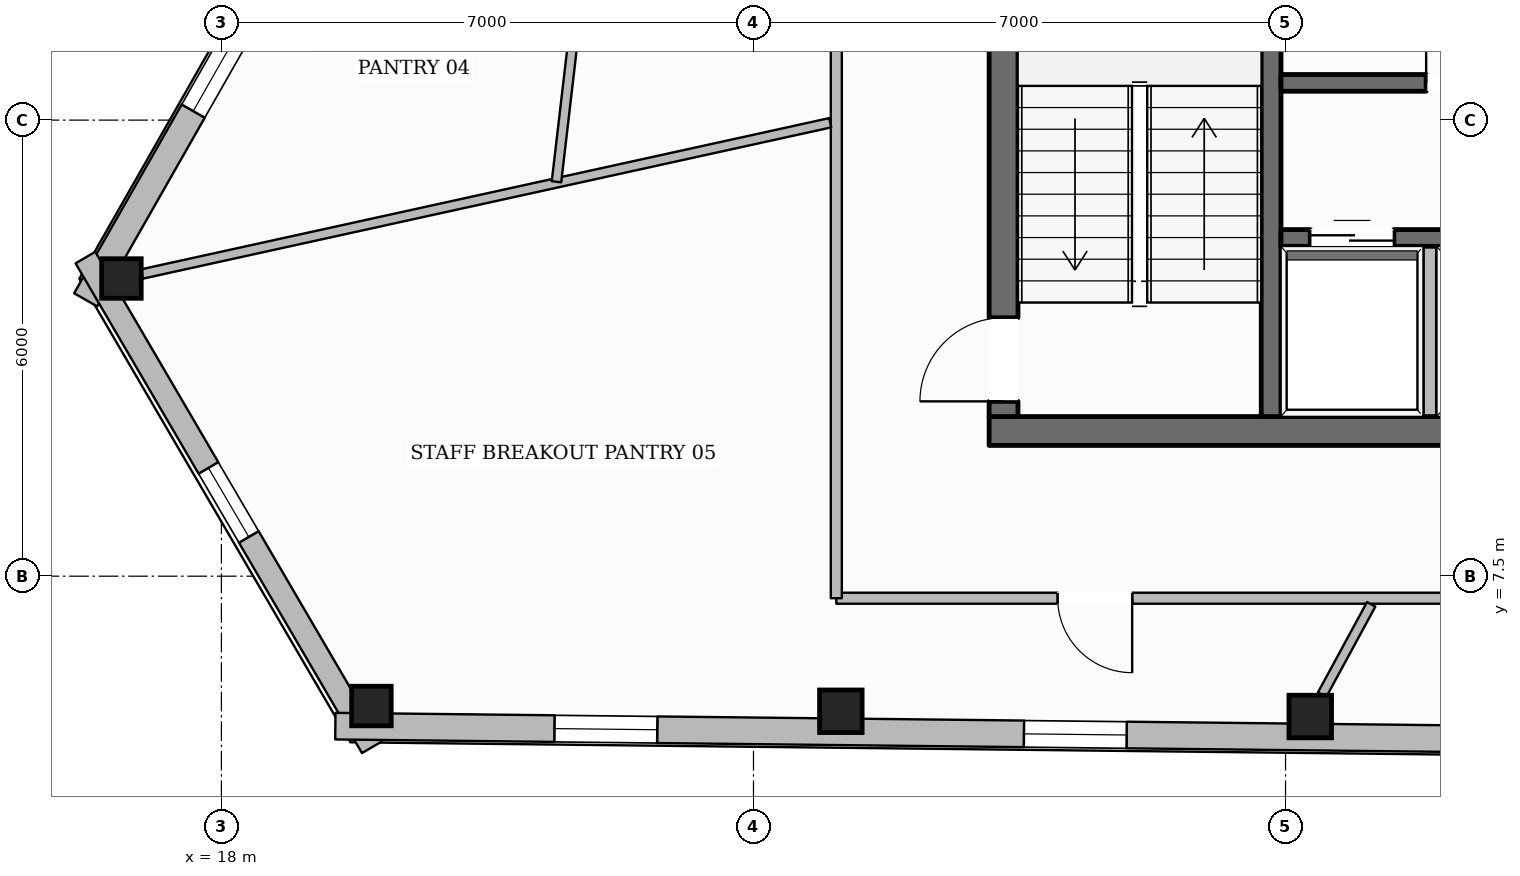
"""IFC4 building model, lengths in metres.
Left out: names, types, materials, properties, quantities, classifications, styles, units other than length and angle.
Written with IfcOpenShell. Run it as: python <this file> out.ifc"""

import sys

from ifc_helpers import new_model, si_unit, direction, frame, frame_2d, origin, origin_2d, place, context, subcontext, project, spatial, rectangle, hollow_rectangle, extrude, element, fill, save


model = new_model("IFC4")
c1 = context("Model", 3, precision=1e-05, world=origin(), true_north=direction((0.0, 1.0)))
c2 = subcontext(c1, "Body", "Model", "MODEL_VIEW")
j1 = project(units=[si_unit("LENGTHUNIT", "METRE"), si_unit("PLANEANGLEUNIT", "RADIAN")], contexts=[c1])
p1 = place(None, origin())
s1 = spatial("IfcSite", under=j1, at=p1, CompositionType="ELEMENT")
p2 = place(p1, origin())
s2 = spatial("IfcBuilding", under=s1, at=p2, CompositionType="ELEMENT")
p3 = place(p2, frame((0.0, 0.0, 251.05)))
s3 = spatial("IfcBuildingStorey", under=s2, at=p3, CompositionType="ELEMENT", Elevation=251.05)
p4 = place(p3, frame((28.1, 9.41, 0.0), z_axis=(0.0, 0.0, 1.0), x_axis=(1.0, 0.0, 0.0)))
e1 = element("IfcWall", 1, at=p4, inside=s3, PredefinedType="SOLIDWALL", context=c2, shape_type="SweptSolid", body=[
    extrude(rectangle(XDim=19.8, YDim=0.38, at=frame_2d((9.9, 0.0))), origin(), (0.0, 0.0, 1.0), 3.61),
])
p5 = place(p4, frame((10.4, 0.0, 0.0)))
e2 = element("IfcOpeningElement", 2, at=p5, cuts=e1, PredefinedType="OPENING", context=c2, shape_type="SweptSolid", body=[
    extrude(rectangle(XDim=1.4, YDim=2.2, at=frame_2d((0.7, 1.1))), frame((0.0, 0.2, 0.0), z_axis=(0.0, -1.0, 0.0), x_axis=(1.0, 0.0, 0.0)), (0.0, 0.0, 1.0), 0.4),
])
p6 = place(p3, frame((28.29, 9.6, 0.0), z_axis=(0.0, 0.0, 1.0), x_axis=(0.0, 1.0, 0.0)))
e3 = element("IfcWall", 3, at=p6, inside=s3, PredefinedType="SOLIDWALL", context=c2, shape_type="SweptSolid", body=[
    extrude(rectangle(XDim=13.0, YDim=0.38, at=frame_2d((6.5, 0.0))), origin(), (0.0, 0.0, 1.0), 3.61),
])
p7 = place(p6, frame((0.2, 0.0, 0.0)))
e4 = element("IfcOpeningElement", 4, at=p7, cuts=e3, PredefinedType="OPENING", context=c2, shape_type="SweptSolid", body=[
    extrude(rectangle(XDim=1.1, YDim=2.15, at=frame_2d((0.55, 1.075))), frame((0.0, 0.2, 0.0), z_axis=(0.0, -1.0, 0.0), x_axis=(1.0, 0.0, 0.0)), (0.0, 0.0, 1.0), 0.4),
])
p8 = place(p6, frame((8.4, 0.0, 0.0)))
e5 = element("IfcOpeningElement", 5, at=p8, cuts=e3, PredefinedType="OPENING", context=c2, shape_type="SweptSolid", body=[
    extrude(rectangle(XDim=0.9, YDim=2.1, at=frame_2d((0.45, 1.05))), frame((0.0, 0.2, 0.0), z_axis=(0.0, -1.0, 0.0), x_axis=(1.0, 0.0, 0.0)), (0.0, 0.0, 1.0), 0.4),
])
p9 = place(p3, frame((31.81, 9.6, 0.0), z_axis=(0.0, 0.0, 1.0), x_axis=(0.0, 1.0, 0.0)))
e6 = element("IfcWall", 6, at=p9, inside=s3, PredefinedType="SHEAR", context=c2, shape_type="SweptSolid", body=[
    extrude(rectangle(XDim=13.0, YDim=0.26, at=frame_2d((6.5, 0.0))), origin(), (0.0, 0.0, 1.0), 3.61),
])
p10 = place(p9, frame((10.925, 0.0, 0.0)))
e7 = element("IfcOpeningElement", 7, at=p10, cuts=e6, PredefinedType="OPENING", context=c2, shape_type="SweptSolid", body=[
    extrude(rectangle(XDim=1.25, YDim=2.25, at=frame_2d((0.625, 1.125))), frame((0.0, 0.14, 0.0), z_axis=(0.0, -1.0, 0.0), x_axis=(1.0, 0.0, 0.0)), (0.0, 0.0, 1.0), 0.28),
])
p11 = place(p3, frame((31.94, 13.99, 0.0), z_axis=(0.0, 0.0, 1.0), x_axis=(1.0, 0.0, 0.0)))
e8 = element("IfcWall", 8, at=p11, inside=s3, PredefinedType="SOLIDWALL", context=c2, shape_type="SweptSolid", body=[
    extrude(rectangle(XDim=12.12, YDim=0.22, at=frame_2d((6.06, 0.0))), origin(), (0.0, 0.0, 1.0), 3.61),
])
p12 = place(p11, frame((1.91, 0.0, 0.0)))
e9 = element("IfcOpeningElement", 9, at=p12, cuts=e8, PredefinedType="OPENING", context=c2, shape_type="SweptSolid", body=[
    extrude(rectangle(XDim=0.9, YDim=2.1, at=frame_2d((0.45, 1.05))), frame((0.0, 0.12, 0.0), z_axis=(0.0, -1.0, 0.0), x_axis=(1.0, 0.0, 0.0)), (0.0, 0.0, 1.0), 0.24),
])
p13 = place(p11, frame((7.95, 0.0, 0.0)))
e10 = element("IfcOpeningElement", 10, at=p13, cuts=e8, PredefinedType="OPENING", context=c2, shape_type="SweptSolid", body=[
    extrude(rectangle(XDim=1.02, YDim=2.15, at=frame_2d((0.51, 1.075))), frame((0.0, 0.12, 0.0), z_axis=(0.0, -1.0, 0.0), x_axis=(1.0, 0.0, 0.0)), (0.0, 0.0, 1.0), 0.24),
])
p14 = place(p3, frame((31.94, 11.95, 0.0), z_axis=(0.0, 0.0, 1.0), x_axis=(1.0, 0.0, 0.0)))
e11 = element("IfcWall", 11, at=p14, inside=s3, PredefinedType="SOLIDWALL", context=c2, shape_type="SweptSolid", body=[
    extrude(rectangle(XDim=6.19, YDim=0.22, at=frame_2d((3.095, 0.0))), origin(), (0.0, 0.0, 1.0), 3.61),
])
p15 = place(p14, frame((0.385, 0.0, 0.0)))
e12 = element("IfcOpeningElement", 12, at=p15, cuts=e11, PredefinedType="OPENING", context=c2, shape_type="SweptSolid", body=[
    extrude(rectangle(XDim=1.1, YDim=2.2, at=frame_2d((0.55, 1.1))), frame((0.0, 0.12, 0.0), z_axis=(0.0, -1.0, 0.0), x_axis=(1.0, 0.0, 0.0)), (0.0, 0.0, 1.0), 0.24),
])
p16 = place(p14, frame((2.435, 0.0, 0.0)))
e13 = element("IfcOpeningElement", 13, at=p16, cuts=e11, PredefinedType="OPENING", context=c2, shape_type="SweptSolid", body=[
    extrude(rectangle(XDim=1.1, YDim=2.2, at=frame_2d((0.55, 1.1))), frame((0.0, 0.12, 0.0), z_axis=(0.0, -1.0, 0.0), x_axis=(1.0, 0.0, 0.0)), (0.0, 0.0, 1.0), 0.24),
])
p17 = place(p14, frame((4.485, 0.0, 0.0)))
e14 = element("IfcOpeningElement", 14, at=p17, cuts=e11, PredefinedType="OPENING", context=c2, shape_type="SweptSolid", body=[
    extrude(rectangle(XDim=1.1, YDim=2.2, at=frame_2d((0.55, 1.1))), frame((0.0, 0.12, 0.0), z_axis=(0.0, -1.0, 0.0), x_axis=(1.0, 0.0, 0.0)), (0.0, 0.0, 1.0), 0.24),
])
for number, where, z_axis, x_axis in (
    (15, (16.685, 11.416, 0.0), (0.0, 0.0, 1.0), (1.0, 0.0, 0.0)),
    (16, (19.974, 5.792, 0.0), (0.0, 0.0, 1.0), (1.0, 0.0, 0.0)),
):
    element("IfcColumn", number, at=place(p3, frame(where, z_axis=z_axis, x_axis=x_axis)), inside=s3, PredefinedType="COLUMN", context=c2, shape_type="SweptSolid", body=[
        extrude(hollow_rectangle(XDim=0.52, YDim=0.52, WallThickness=0.024, at=origin_2d()), origin(), (0.0, 0.0, 1.0), 3.61),
    ])
for number, where, z_axis, x_axis in (
    (17, (26.149, 5.723, 0.0), (0.0, 0.0, 1.0), (1.0, 0.0, 0.0)),
    (18, (32.325, 5.654, 0.0), (0.0, 0.0, 1.0), (1.0, 0.0, 0.0)),
):
    element("IfcColumn", number, at=place(p3, frame(where, z_axis=z_axis, x_axis=x_axis)), inside=s3, PredefinedType="COLUMN", context=c2, shape_type="SweptSolid", body=[
        extrude(hollow_rectangle(XDim=0.56, YDim=0.56, WallThickness=0.025, at=origin_2d()), origin(), (0.0, 0.0, 1.0), 3.61),
    ])
p18 = place(p3, frame((16.214, 11.135, 0.0), z_axis=(0.0, 0.0, 1.0), x_axis=(0.49510347201, 0.868834018673, 0.0)))
e19 = element("IfcWall", 19, at=p18, inside=s3, PredefinedType="STANDARD", context=c2, shape_type="SweptSolid", body=[
    extrude(rectangle(XDim=37.643, YDim=0.35, at=frame_2d((18.822, 0.0))), origin(), (0.0, 0.0, 1.0), 3.196),
])
p19 = place(p18, frame((33.429, 0.0, 0.65)))
e20 = element("IfcOpeningElement", 20, at=p19, cuts=e19, PredefinedType="OPENING", context=c2, shape_type="SweptSolid", body=[
    extrude(rectangle(XDim=1.35, YDim=1.75, at=frame_2d((0.675, 0.875))), frame((0.0, 0.185, 0.0), z_axis=(0.0, -1.0, 0.0), x_axis=(1.0, 0.0, 0.0)), (0.0, 0.0, 1.0), 0.37),
])
p20 = place(p18, frame((27.315, 0.0, 0.65)))
e21 = element("IfcOpeningElement", 21, at=p20, cuts=e19, PredefinedType="OPENING", context=c2, shape_type="SweptSolid", body=[
    extrude(rectangle(XDim=1.35, YDim=1.75, at=frame_2d((0.675, 0.875))), frame((0.0, 0.185, 0.0), z_axis=(0.0, -1.0, 0.0), x_axis=(1.0, 0.0, 0.0)), (0.0, 0.0, 1.0), 0.37),
])
p21 = place(p18, frame((15.087, 0.0, 0.65)))
e22 = element("IfcOpeningElement", 22, at=p21, cuts=e19, PredefinedType="OPENING", context=c2, shape_type="SweptSolid", body=[
    extrude(rectangle(XDim=1.35, YDim=1.75, at=frame_2d((0.675, 0.875))), frame((0.0, 0.185, 0.0), z_axis=(0.0, -1.0, 0.0), x_axis=(1.0, 0.0, 0.0)), (0.0, 0.0, 1.0), 0.37),
])
p22 = place(p18, frame((8.973, 0.0, 0.65)))
e23 = element("IfcOpeningElement", 23, at=p22, cuts=e19, PredefinedType="OPENING", context=c2, shape_type="SweptSolid", body=[
    extrude(rectangle(XDim=1.35, YDim=1.75, at=frame_2d((0.675, 0.875))), frame((0.0, 0.185, 0.0), z_axis=(0.0, -1.0, 0.0), x_axis=(1.0, 0.0, 0.0)), (0.0, 0.0, 1.0), 0.37),
])
p23 = place(p18, frame((2.859, 0.0, 0.65)))
e24 = element("IfcOpeningElement", 24, at=p23, cuts=e19, PredefinedType="OPENING", context=c2, shape_type="SweptSolid", body=[
    extrude(rectangle(XDim=1.35, YDim=1.75, at=frame_2d((0.675, 0.875))), frame((0.0, 0.185, 0.0), z_axis=(0.0, -1.0, 0.0), x_axis=(1.0, 0.0, 0.0)), (0.0, 0.0, 1.0), 0.37),
])
p24 = place(p3, frame((19.979, 5.248, 0.0), z_axis=(0.0, 0.0, 1.0), x_axis=(-0.50480008765, 0.863236277915, 0.0)))
e25 = element("IfcWall", 25, at=p24, inside=s3, PredefinedType="STANDARD", context=c2, shape_type="SweptSolid", body=[
    extrude(rectangle(XDim=7.464, YDim=0.3, at=frame_2d((3.732, 0.0))), origin(), (0.0, 0.0, 1.0), 3.196),
])
p25 = place(p24, frame((3.207, 0.0, 0.65)))
e26 = element("IfcOpeningElement", 26, at=p25, cuts=e25, PredefinedType="OPENING", context=c2, shape_type="SweptSolid", body=[
    extrude(rectangle(XDim=1.05, YDim=1.7, at=frame_2d((0.525, 0.85))), frame((0.0, 0.16, 0.0), z_axis=(0.0, -1.0, 0.0), x_axis=(1.0, 0.0, 0.0)), (0.0, 0.0, 1.0), 0.32),
])
p26 = place(p3, frame((57.506, 5.102, 0.0), z_axis=(0.0, 0.0, 1.0), x_axis=(-0.999937327785, 0.011195557226, 0.0)))
e27 = element("IfcWall", 27, at=p26, inside=s3, PredefinedType="STANDARD", context=c2, shape_type="SweptSolid", body=[
    extrude(rectangle(XDim=38.01, YDim=0.35, at=frame_2d((19.005, 0.0))), origin(), (0.0, 0.0, 1.0), 3.196),
])
p27 = place(p26, frame((33.775, 0.0, 0.65)))
e28 = element("IfcOpeningElement", 28, at=p27, cuts=e27, PredefinedType="OPENING", context=c2, shape_type="SweptSolid", body=[
    extrude(rectangle(XDim=1.35, YDim=1.75, at=frame_2d((0.675, 0.875))), frame((0.0, 0.185, 0.0), z_axis=(0.0, -1.0, 0.0), x_axis=(1.0, 0.0, 0.0)), (0.0, 0.0, 1.0), 0.37),
])
p28 = place(p26, frame((27.599, 0.0, 0.65)))
e29 = element("IfcOpeningElement", 29, at=p28, cuts=e27, PredefinedType="OPENING", context=c2, shape_type="SweptSolid", body=[
    extrude(rectangle(XDim=1.35, YDim=1.75, at=frame_2d((0.675, 0.875))), frame((0.0, 0.185, 0.0), z_axis=(0.0, -1.0, 0.0), x_axis=(1.0, 0.0, 0.0)), (0.0, 0.0, 1.0), 0.37),
])
p29 = place(p26, frame((15.247, 0.0, 0.65)))
e30 = element("IfcOpeningElement", 30, at=p29, cuts=e27, PredefinedType="OPENING", context=c2, shape_type="SweptSolid", body=[
    extrude(rectangle(XDim=1.35, YDim=1.75, at=frame_2d((0.675, 0.875))), frame((0.0, 0.185, 0.0), z_axis=(0.0, -1.0, 0.0), x_axis=(1.0, 0.0, 0.0)), (0.0, 0.0, 1.0), 0.37),
])
p30 = place(p26, frame((9.071, 0.0, 0.65)))
e31 = element("IfcOpeningElement", 31, at=p30, cuts=e27, PredefinedType="OPENING", context=c2, shape_type="SweptSolid", body=[
    extrude(rectangle(XDim=1.35, YDim=1.75, at=frame_2d((0.675, 0.875))), frame((0.0, 0.185, 0.0), z_axis=(0.0, -1.0, 0.0), x_axis=(1.0, 0.0, 0.0)), (0.0, 0.0, 1.0), 0.37),
])
p31 = place(p26, frame((2.896, 0.0, 0.65)))
e32 = element("IfcOpeningElement", 32, at=p31, cuts=e27, PredefinedType="OPENING", context=c2, shape_type="SweptSolid", body=[
    extrude(rectangle(XDim=1.35, YDim=1.75, at=frame_2d((0.675, 0.875))), frame((0.0, 0.185, 0.0), z_axis=(0.0, -1.0, 0.0), x_axis=(1.0, 0.0, 0.0)), (0.0, 0.0, 1.0), 0.37),
])
p32 = place(p3, frame((33.9, 9.49, 0.0), z_axis=(0.0, 0.0, 1.0), x_axis=(0.0, 1.0, 0.0)))
e33 = element("IfcWall", 33, at=p32, inside=s3, PredefinedType="PARTITIONING", context=c2, shape_type="SweptSolid", body=[
    extrude(rectangle(XDim=2.35, YDim=0.165, at=frame_2d((1.175, 0.0))), origin(), (0.0, 0.0, 1.0), 3.61),
])
p33 = place(p3, frame((49.91, 7.21, 0.0), z_axis=(0.0, 0.0, 1.0), x_axis=(-1.0, 0.0, 0.0)))
e34 = element("IfcWall", 34, at=p33, inside=s3, PredefinedType="PARTITIONING", context=c2, shape_type="SweptSolid", body=[
    extrude(rectangle(XDim=23.82, YDim=0.145, at=frame_2d((11.91, 0.0))), origin(), (0.0, 0.0, 1.0), 3.61),
])
p34 = place(p33, frame((19.928, 0.0, 0.0)))
e35 = element("IfcOpeningElement", 35, at=p34, cuts=e34, PredefinedType="OPENING", context=c2, shape_type="SweptSolid", body=[
    extrude(rectangle(XDim=0.98, YDim=2.15, at=frame_2d((0.49, 1.075))), frame((0.0, 0.083, 0.0), z_axis=(0.0, -1.0, 0.0), x_axis=(1.0, 0.0, 0.0)), (0.0, 0.0, 1.0), 0.165),
])
p35 = place(p33, frame((8.487, 0.0, 0.0)))
e36 = element("IfcOpeningElement", 36, at=p35, cuts=e34, PredefinedType="OPENING", context=c2, shape_type="SweptSolid", body=[
    extrude(rectangle(XDim=0.98, YDim=2.15, at=frame_2d((0.49, 1.075))), frame((0.0, 0.083, 0.0), z_axis=(0.0, -1.0, 0.0), x_axis=(1.0, 0.0, 0.0)), (0.0, 0.0, 1.0), 0.165),
])
p36 = place(p3, frame((26.09, 7.21, 0.0), z_axis=(0.0, 0.0, 1.0), x_axis=(0.0, 1.0, 0.0)))
e37 = element("IfcWall", 37, at=p36, inside=s3, PredefinedType="PARTITIONING", context=c2, shape_type="SweptSolid", body=[
    extrude(rectangle(XDim=17.78, YDim=0.145, at=frame_2d((8.89, 0.0))), origin(), (0.0, 0.0, 1.0), 3.349),
])
p37 = place(p36, frame((11.443, 0.0, 0.0)))
e38 = element("IfcOpeningElement", 38, at=p37, cuts=e37, PredefinedType="OPENING", context=c2, shape_type="SweptSolid", body=[
    extrude(rectangle(XDim=0.98, YDim=2.15, at=frame_2d((0.49, 1.075))), frame((0.0, 0.083, 0.0), z_axis=(0.0, -1.0, 0.0), x_axis=(1.0, 0.0, 0.0)), (0.0, 0.0, 1.0), 0.165),
])
p38 = place(p3, frame((26.01, 13.465, 0.0), z_axis=(0.0, 0.0, 1.0), x_axis=(-0.976700346334, -0.214607626778, 0.0)))
e39 = element("IfcWall", 39, at=p38, inside=s3, PredefinedType="PARTITIONING", context=c2, shape_type="SweptSolid", body=[
    extrude(rectangle(XDim=9.273, YDim=0.125, at=frame_2d((4.636, 0.0))), origin(), (0.0, 0.0, 1.0), 3.246),
])
p39 = place(p3, frame((33.127, 7.129, 0.0), z_axis=(0.0, 0.0, 1.0), x_axis=(-0.47743452788, -0.878667327029, 0.0)))
e40 = element("IfcWall", 40, at=p39, inside=s3, PredefinedType="PARTITIONING", context=c2, shape_type="SweptSolid", body=[
    extrude(rectangle(XDim=1.352, YDim=0.125, at=frame_2d((0.676, 0.0))), origin(), (0.0, 0.0, 1.0), 3.61),
])
p40 = place(p3, frame((23.733, 24.027, 0.0), z_axis=(0.0, 0.0, 1.0), x_axis=(-0.116028401935, -0.993245896012, 0.0)))
e41 = element("IfcWall", 41, at=p40, inside=s3, PredefinedType="PARTITIONING", context=c2, shape_type="SweptSolid", body=[
    extrude(rectangle(XDim=11.415, YDim=0.125, at=frame_2d((5.708, 0.0))), origin(), (0.0, 0.0, 1.0), 3.199),
])
p41 = place(p40, frame((5.142, 0.0, 0.0)))
e42 = element("IfcOpeningElement", 42, at=p41, cuts=e41, PredefinedType="OPENING", context=c2, shape_type="SweptSolid", body=[
    extrude(rectangle(XDim=0.98, YDim=2.15, at=frame_2d((0.49, 1.075))), frame((0.0, 0.073, 0.0), z_axis=(0.0, -1.0, 0.0), x_axis=(1.0, 0.0, 0.0)), (0.0, 0.0, 1.0), 0.145),
])
p42 = place(p23, origin())
e43 = element("IfcWindow", 43, at=p42, inside=s3, PartitioningType="SINGLE_PANEL", PredefinedType="WINDOW", context=c2, shape_type="SweptSolid", body=[
    extrude(rectangle(XDim=1.35, YDim=1.75, at=frame_2d((0.675, 0.875))), frame((0.0, 0.03, 0.0), z_axis=(0.0, -1.0, 0.0), x_axis=(1.0, 0.0, 0.0)), (0.0, 0.0, 1.0), 0.06),
])
fill(e24, e43)
p43 = place(p27, origin())
e44 = element("IfcWindow", 44, at=p43, inside=s3, PartitioningType="SINGLE_PANEL", PredefinedType="WINDOW", context=c2, shape_type="SweptSolid", body=[
    extrude(rectangle(XDim=1.35, YDim=1.75, at=frame_2d((0.675, 0.875))), frame((0.0, 0.03, 0.0), z_axis=(0.0, -1.0, 0.0), x_axis=(1.0, 0.0, 0.0)), (0.0, 0.0, 1.0), 0.06),
])
fill(e28, e44)
p44 = place(p28, origin())
e45 = element("IfcWindow", 45, at=p44, inside=s3, PartitioningType="SINGLE_PANEL", PredefinedType="WINDOW", context=c2, shape_type="SweptSolid", body=[
    extrude(rectangle(XDim=1.35, YDim=1.75, at=frame_2d((0.675, 0.875))), frame((0.0, 0.03, 0.0), z_axis=(0.0, -1.0, 0.0), x_axis=(1.0, 0.0, 0.0)), (0.0, 0.0, 1.0), 0.06),
])
fill(e29, e45)
p45 = place(p25, origin())
e46 = element("IfcWindow", 46, at=p45, inside=s3, PartitioningType="SINGLE_PANEL", PredefinedType="WINDOW", context=c2, shape_type="SweptSolid", body=[
    extrude(rectangle(XDim=1.05, YDim=1.7, at=frame_2d((0.525, 0.85))), frame((0.0, 0.03, 0.0), z_axis=(0.0, -1.0, 0.0), x_axis=(1.0, 0.0, 0.0)), (0.0, 0.0, 1.0), 0.06),
])
fill(e26, e46)
p46 = place(p7, origin())
e47 = element("IfcDoor", 47, at=p46, inside=s3, OperationType="SINGLE_SWING_LEFT", PredefinedType="DOOR", context=c2, shape_type="SweptSolid", body=[
    extrude(rectangle(XDim=1.1, YDim=2.15, at=frame_2d((0.55, 1.075))), frame((0.0, 0.025, 0.0), z_axis=(0.0, -1.0, 0.0), x_axis=(1.0, 0.0, 0.0)), (0.0, 0.0, 1.0), 0.05),
])
fill(e4, e47)
p47 = place(p15, origin())
e48 = element("IfcDoor", 48, at=p47, inside=s3, OperationType="DOUBLE_DOOR_SLIDING", PredefinedType="DOOR", context=c2, shape_type="SweptSolid", body=[
    extrude(rectangle(XDim=1.1, YDim=2.2, at=frame_2d((0.55, 1.1))), frame((0.0, 0.025, 0.0), z_axis=(0.0, -1.0, 0.0), x_axis=(1.0, 0.0, 0.0)), (0.0, 0.0, 1.0), 0.05),
])
fill(e12, e48)
p48 = place(p12, origin())
e49 = element("IfcDoor", 49, at=p48, inside=s3, OperationType="SINGLE_SWING_LEFT", PredefinedType="DOOR", context=c2, shape_type="SweptSolid", body=[
    extrude(rectangle(XDim=0.9, YDim=2.1, at=frame_2d((0.45, 1.05))), frame((0.0, 0.025, 0.0), z_axis=(0.0, -1.0, 0.0), x_axis=(1.0, 0.0, 0.0)), (0.0, 0.0, 1.0), 0.05),
])
fill(e9, e49)
p49 = place(p34, origin())
e50 = element("IfcDoor", 50, at=p49, inside=s3, OperationType="SINGLE_SWING_LEFT", PredefinedType="DOOR", context=c2, shape_type="SweptSolid", body=[
    extrude(rectangle(XDim=0.98, YDim=2.15, at=frame_2d((0.49, 1.075))), frame((0.0, 0.025, 0.0), z_axis=(0.0, -1.0, 0.0), x_axis=(1.0, 0.0, 0.0)), (0.0, 0.0, 1.0), 0.05),
])
fill(e35, e50)
save(model, sys.argv[1])
